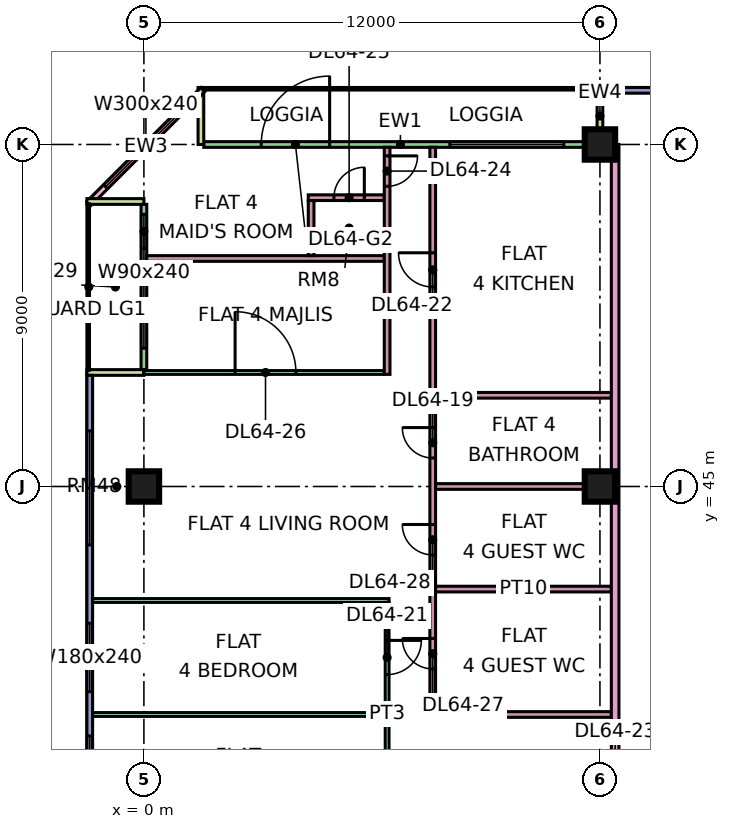
"""IFC4 building model, lengths in metres.
Left out: names, types, materials, properties, quantities, classifications, styles, units other than length and angle.
Written with IfcOpenShell. Run it as: python <this file> out.ifc"""

import sys

from ifc_helpers import new_model, si_unit, direction, frame, frame_2d, origin, origin_2d, place, context, subcontext, project, spatial, rectangle, extrude, element, fill, save


model = new_model("IFC4")
c1 = context("Model", 3, precision=1e-05, world=origin(), true_north=direction((0.0, 1.0)))
c2 = subcontext(c1, "Body", "Model", "MODEL_VIEW")
j1 = project(units=[si_unit("LENGTHUNIT", "METRE"), si_unit("PLANEANGLEUNIT", "RADIAN")], contexts=[c1])
p1 = place(None, origin())
s1 = spatial("IfcSite", under=j1, at=p1, CompositionType="ELEMENT")
p2 = place(p1, origin())
s2 = spatial("IfcBuilding", under=s1, at=p2, CompositionType="ELEMENT")
p3 = place(p2, frame((0.0, 0.0, 277.15)))
s3 = spatial("IfcBuildingStorey", under=s2, at=p3, CompositionType="ELEMENT", Elevation=277.15)
for number, where, z_axis, x_axis in (
    (1, (0.0, 45.0, 0.0), (0.0, 0.0, 1.0), (1.0, 0.0, 0.0)),
    (2, (12.0, 45.0, 0.0), (0.0, 0.0, 1.0), (1.0, 0.0, 0.0)),
    (3, (12.0, 54.0, 0.0), (0.0, 0.0, 1.0), (1.0, 0.0, 0.0)),
):
    element("IfcColumn", number, at=place(p3, frame(where, z_axis=z_axis, x_axis=x_axis)), inside=s3, PredefinedType="COLUMN", context=c2, shape_type="SweptSolid", body=[
        extrude(rectangle(XDim=0.8, YDim=0.8, at=origin_2d()), origin(), (0.0, 0.0, 1.0), 3.75),
    ])
p4 = place(p3, frame((22.5, 55.425, 0.0), z_axis=(0.0, 0.0, 1.0), x_axis=(-1.0, 0.0, 0.0)))
e4 = element("IfcWall", 4, at=p4, inside=s3, PredefinedType="SOLIDWALL", context=c2, shape_type="SweptSolid", body=[
    extrude(rectangle(XDim=10.425, YDim=0.15, at=frame_2d((5.212, 0.0))), origin(), (0.0, 0.0, 1.0), 3.35),
])
p5 = place(p4, frame((1.05, 0.0, 0.45)))
e5 = element("IfcOpeningElement", 5, at=p5, cuts=e4, PredefinedType="OPENING", context=c2, shape_type="SweptSolid", body=[
    extrude(rectangle(XDim=4.8, YDim=2.4, at=frame_2d((2.4, 1.2))), frame((0.0, 0.085, 0.0), z_axis=(0.0, -1.0, 0.0), x_axis=(1.0, 0.0, 0.0)), (0.0, 0.0, 1.0), 0.17),
])
p6 = place(p3, frame((11.925, 54.0, 0.0), z_axis=(0.0, 0.0, 1.0), x_axis=(-1.0, 0.0, 0.0)))
e6 = element("IfcWall", 6, at=p6, inside=s3, PredefinedType="SOLIDWALL", context=c2, shape_type="SweptSolid", body=[
    extrude(rectangle(XDim=10.35, YDim=0.15, at=frame_2d((5.175, 0.0))), origin(), (0.0, 0.0, 1.0), 3.35),
])
p7 = place(p6, frame((0.875, 0.0, 0.45)))
e7 = element("IfcOpeningElement", 7, at=p7, cuts=e6, PredefinedType="OPENING", context=c2, shape_type="SweptSolid", body=[
    extrude(rectangle(XDim=3.0, YDim=2.4, at=frame_2d((1.5, 1.2))), frame((0.0, 0.085, 0.0), z_axis=(0.0, -1.0, 0.0), x_axis=(1.0, 0.0, 0.0)), (0.0, 0.0, 1.0), 0.17),
])
p8 = place(p6, frame((7.038, 0.0, 0.0)))
e8 = element("IfcOpeningElement", 8, at=p8, cuts=e6, PredefinedType="OPENING", context=c2, shape_type="SweptSolid", body=[
    extrude(rectangle(XDim=1.8, YDim=2.4, at=frame_2d((0.9, 1.2))), frame((0.0, 0.085, 0.0), z_axis=(0.0, -1.0, 0.0), x_axis=(1.0, 0.0, 0.0)), (0.0, 0.0, 1.0), 0.17),
])
for number, where, z_axis, x_axis in (
    (9, (12.0, 55.5, 0.0), (0.0, 0.0, 1.0), (0.0, -1.0, 0.0)),
    (10, (1.5, 55.5, 0.0), (0.0, 0.0, 1.0), (0.0, -1.0, 0.0)),
):
    element("IfcWall", number, at=place(p3, frame(where, z_axis=z_axis, x_axis=x_axis)), inside=s3, PredefinedType="SOLIDWALL", context=c2, shape_type="SweptSolid", body=[
        extrude(rectangle(XDim=1.5, YDim=0.15, at=frame_2d((0.75, 0.0))), origin(), (0.0, 0.0, 1.0), 3.35),
    ])
p9 = place(p3, frame((1.553, 55.447, 0.0), z_axis=(0.0, 0.0, 1.0), x_axis=(-0.707106781187, -0.707106781187, 0.0)))
e11 = element("IfcWall", 11, at=p9, inside=s3, PredefinedType="SOLIDWALL", context=c2, shape_type="SweptSolid", body=[
    extrude(rectangle(XDim=4.243, YDim=0.15, at=frame_2d((2.121, 0.0))), origin(), (0.0, 0.0, 1.0), 3.35),
])
p10 = place(p9, frame((0.621, 0.0, 0.45)))
e12 = element("IfcOpeningElement", 12, at=p10, cuts=e11, PredefinedType="OPENING", context=c2, shape_type="SweptSolid", body=[
    extrude(rectangle(XDim=3.0, YDim=2.4, at=frame_2d((1.5, 1.2))), frame((0.0, 0.085, 0.0), z_axis=(0.0, -1.0, 0.0), x_axis=(1.0, 0.0, 0.0)), (0.0, 0.0, 1.0), 0.17),
])
p11 = place(p3, frame((0.0, 52.425, 0.0), z_axis=(0.0, 0.0, 1.0), x_axis=(0.0, -1.0, 0.0)))
e13 = element("IfcWall", 13, at=p11, inside=s3, PredefinedType="SOLIDWALL", context=c2, shape_type="SweptSolid", body=[
    extrude(rectangle(XDim=4.35, YDim=0.15, at=frame_2d((2.175, 0.0))), origin(), (0.0, 0.0, 1.0), 3.35),
])
p12 = place(p11, frame((0.262, 0.0, 0.45)))
e14 = element("IfcOpeningElement", 14, at=p12, cuts=e13, PredefinedType="OPENING", context=c2, shape_type="SweptSolid", body=[
    extrude(rectangle(XDim=0.9, YDim=2.4, at=frame_2d((0.45, 1.2))), frame((0.0, 0.085, 0.0), z_axis=(0.0, -1.0, 0.0), x_axis=(1.0, 0.0, 0.0)), (0.0, 0.0, 1.0), 0.17),
])
p13 = place(p11, frame((1.988, 0.0, 0.45)))
e15 = element("IfcOpeningElement", 15, at=p13, cuts=e13, PredefinedType="OPENING", context=c2, shape_type="SweptSolid", body=[
    extrude(rectangle(XDim=1.8, YDim=2.4, at=frame_2d((0.9, 1.2))), frame((0.0, 0.085, 0.0), z_axis=(0.0, -1.0, 0.0), x_axis=(1.0, 0.0, 0.0)), (0.0, 0.0, 1.0), 0.17),
])
for number, where, z_axis, x_axis in (
    (16, (-1.5, 52.5, 0.0), (0.0, 0.0, 1.0), (1.0, 0.0, 0.0)),
    (17, (-1.5, 48.0, 0.0), (0.0, 0.0, 1.0), (1.0, 0.0, 0.0)),
):
    element("IfcWall", number, at=place(p3, frame(where, z_axis=z_axis, x_axis=x_axis)), inside=s3, PredefinedType="SOLIDWALL", context=c2, shape_type="SweptSolid", body=[
        extrude(rectangle(XDim=1.5, YDim=0.15, at=frame_2d((0.75, 0.0))), origin(), (0.0, 0.0, 1.0), 3.35),
    ])
p14 = place(p3, frame((-1.425, 47.925, 0.0), z_axis=(0.0, 0.0, 1.0), x_axis=(0.0, -1.0, 0.0)))
e18 = element("IfcWall", 18, at=p14, inside=s3, PredefinedType="SOLIDWALL", context=c2, shape_type="SweptSolid", body=[
    extrude(rectangle(XDim=11.85, YDim=0.15, at=frame_2d((5.925, 0.0))), origin(), (0.0, 0.0, 1.0), 3.35),
])
p15 = place(p14, frame((1.462, 0.0, 0.45)))
e19 = element("IfcOpeningElement", 19, at=p15, cuts=e18, PredefinedType="OPENING", context=c2, shape_type="SweptSolid", body=[
    extrude(rectangle(XDim=3.0, YDim=2.4, at=frame_2d((1.5, 1.2))), frame((0.0, 0.085, 0.0), z_axis=(0.0, -1.0, 0.0), x_axis=(1.0, 0.0, 0.0)), (0.0, 0.0, 1.0), 0.17),
])
p16 = place(p14, frame((6.525, 0.0, 0.45)))
e20 = element("IfcOpeningElement", 20, at=p16, cuts=e18, PredefinedType="OPENING", context=c2, shape_type="SweptSolid", body=[
    extrude(rectangle(XDim=1.8, YDim=2.4, at=frame_2d((0.9, 1.2))), frame((0.0, 0.085, 0.0), z_axis=(0.0, -1.0, 0.0), x_axis=(1.0, 0.0, 0.0)), (0.0, 0.0, 1.0), 0.17),
])
p17 = place(p14, frame((9.488, 0.0, 0.45)))
e21 = element("IfcOpeningElement", 21, at=p17, cuts=e18, PredefinedType="OPENING", context=c2, shape_type="SweptSolid", body=[
    extrude(rectangle(XDim=1.8, YDim=2.4, at=frame_2d((0.9, 1.2))), frame((0.0, 0.085, 0.0), z_axis=(0.0, -1.0, 0.0), x_axis=(1.0, 0.0, 0.0)), (0.0, 0.0, 1.0), 0.17),
])
p18 = place(p3, frame((-1.351, 39.0, 0.0), z_axis=(0.0, 0.0, 1.0), x_axis=(1.0, 0.0, 0.0)))
e22 = element("IfcWall", 22, at=p18, inside=s3, PredefinedType="PARTITIONING", context=c2, shape_type="SweptSolid", body=[
    extrude(rectangle(XDim=7.701, YDim=0.1, at=frame_2d((3.851, 0.0))), origin(), (0.0, 0.0, 1.0), 3.35),
])
p19 = place(p3, frame((-1.35, 42.0, 0.0), z_axis=(0.0, 0.0, 1.0), x_axis=(1.0, 0.0, 0.0)))
e23 = element("IfcWall", 23, at=p19, inside=s3, PredefinedType="PARTITIONING", context=c2, shape_type="SweptSolid", body=[
    extrude(rectangle(XDim=7.8, YDim=0.1, at=frame_2d((3.9, 0.0))), origin(), (0.0, 0.0, 1.0), 3.35),
])
p20 = place(p3, frame((0.0, 48.0, 0.0), z_axis=(0.0, 0.0, 1.0), x_axis=(1.0, 0.0, 0.0)))
e24 = element("IfcWall", 24, at=p20, inside=s3, PredefinedType="PARTITIONING", context=c2, shape_type="SweptSolid", body=[
    extrude(rectangle(XDim=6.325, YDim=0.1, at=frame_2d((3.163, 0.0))), origin(), (0.0, 0.0, 1.0), 3.35),
])
p21 = place(p20, frame((2.4, 0.0, 0.0)))
e25 = element("IfcOpeningElement", 25, at=p21, cuts=e24, PredefinedType="OPENING", context=c2, shape_type="SweptSolid", body=[
    extrude(rectangle(XDim=1.6, YDim=2.1, at=frame_2d((0.8, 1.05))), frame((0.0, 0.06, 0.0), z_axis=(0.0, -1.0, 0.0), x_axis=(1.0, 0.0, 0.0)), (0.0, 0.0, 1.0), 0.12),
])
p22 = place(p3, frame((0.074, 51.0, 0.0), z_axis=(0.0, 0.0, 1.0), x_axis=(1.0, 0.0, 0.0)))
e26 = element("IfcWall", 26, at=p22, inside=s3, PredefinedType="PARTITIONING", context=c2, shape_type="SweptSolid", body=[
    extrude(rectangle(XDim=6.251, YDim=0.15, at=frame_2d((3.125, 0.0))), origin(), (0.0, 0.0, 1.0), 3.35),
])
p23 = place(p3, frame((4.325, 52.6, 0.0), z_axis=(0.0, 0.0, 1.0), x_axis=(1.0, 0.0, 0.0)))
e27 = element("IfcWall", 27, at=p23, inside=s3, PredefinedType="PARTITIONING", context=c2, shape_type="SweptSolid", body=[
    extrude(rectangle(XDim=2.0, YDim=0.15, at=frame_2d((1.0, 0.0))), origin(), (0.0, 0.0, 1.0), 3.35),
])
p24 = place(p23, frame((0.675, 0.0, 0.0)))
e28 = element("IfcOpeningElement", 28, at=p24, cuts=e27, PredefinedType="OPENING", context=c2, shape_type="SweptSolid", body=[
    extrude(rectangle(XDim=0.8, YDim=2.1, at=frame_2d((0.4, 1.05))), frame((0.0, 0.085, 0.0), z_axis=(0.0, -1.0, 0.0), x_axis=(1.0, 0.0, 0.0)), (0.0, 0.0, 1.0), 0.17),
])
p25 = place(p3, frame((4.4, 51.075, 0.0), z_axis=(0.0, 0.0, 1.0), x_axis=(0.0, 1.0, 0.0)))
e29 = element("IfcWall", 29, at=p25, inside=s3, PredefinedType="PARTITIONING", context=c2, shape_type="SweptSolid", body=[
    extrude(rectangle(XDim=1.45, YDim=0.15, at=frame_2d((0.725, 0.0))), origin(), (0.0, 0.0, 1.0), 3.35),
])
p26 = place(p3, frame((6.4, 36.1, 0.0), z_axis=(0.0, 0.0, 1.0), x_axis=(0.0, 1.0, 0.0)))
e30 = element("IfcWall", 30, at=p26, inside=s3, PredefinedType="PARTITIONING", context=c2, shape_type="SweptSolid", body=[
    extrude(rectangle(XDim=5.85, YDim=0.1, at=frame_2d((2.925, 0.0))), origin(), (0.0, 0.0, 1.0), 3.35),
])
p27 = place(p26, frame((0.95, 0.0, 0.0)))
e31 = element("IfcOpeningElement", 31, at=p27, cuts=e30, PredefinedType="OPENING", context=c2, shape_type="SweptSolid", body=[
    extrude(rectangle(XDim=0.9, YDim=2.1, at=frame_2d((0.45, 1.05))), frame((0.0, 0.06, 0.0), z_axis=(0.0, -1.0, 0.0), x_axis=(1.0, 0.0, 0.0)), (0.0, 0.0, 1.0), 0.12),
])
p28 = place(p26, frame((3.95, 0.0, 0.0)))
e32 = element("IfcOpeningElement", 32, at=p28, cuts=e30, PredefinedType="OPENING", context=c2, shape_type="SweptSolid", body=[
    extrude(rectangle(XDim=0.9, YDim=2.1, at=frame_2d((0.45, 1.05))), frame((0.0, 0.06, 0.0), z_axis=(0.0, -1.0, 0.0), x_axis=(1.0, 0.0, 0.0)), (0.0, 0.0, 1.0), 0.12),
])
p29 = place(p3, frame((6.4, 47.95, 0.0), z_axis=(0.0, 0.0, 1.0), x_axis=(0.0, 1.0, 0.0)))
e33 = element("IfcWall", 33, at=p29, inside=s3, PredefinedType="PARTITIONING", context=c2, shape_type="SweptSolid", body=[
    extrude(rectangle(XDim=5.976, YDim=0.15, at=frame_2d((2.988, 0.0))), origin(), (0.0, 0.0, 1.0), 3.35),
])
p30 = place(p29, frame((4.95, 0.0, 0.0)))
e34 = element("IfcOpeningElement", 34, at=p30, cuts=e33, PredefinedType="OPENING", context=c2, shape_type="SweptSolid", body=[
    extrude(rectangle(XDim=0.8, YDim=2.1, at=frame_2d((0.4, 1.05))), frame((0.0, 0.085, 0.0), z_axis=(0.0, -1.0, 0.0), x_axis=(1.0, 0.0, 0.0)), (0.0, 0.0, 1.0), 0.17),
])
p31 = place(p3, frame((7.6, 38.925, 0.0), z_axis=(0.0, 0.0, 1.0), x_axis=(0.0, 1.0, 0.0)))
e35 = element("IfcWall", 35, at=p31, inside=s3, PredefinedType="PARTITIONING", context=c2, shape_type="SweptSolid", body=[
    extrude(rectangle(XDim=15.001, YDim=0.15, at=frame_2d((7.5, 0.0))), origin(), (0.0, 0.0, 1.0), 3.35),
])
p32 = place(p31, frame((6.825, 0.0, 0.0)))
e36 = element("IfcOpeningElement", 36, at=p32, cuts=e35, PredefinedType="OPENING", context=c2, shape_type="SweptSolid", body=[
    extrude(rectangle(XDim=0.8, YDim=2.1, at=frame_2d((0.4, 1.05))), frame((0.0, 0.085, 0.0), z_axis=(0.0, -1.0, 0.0), x_axis=(1.0, 0.0, 0.0)), (0.0, 0.0, 1.0), 0.17),
])
p33 = place(p31, frame((11.325, 0.0, 0.0)))
e37 = element("IfcOpeningElement", 37, at=p33, cuts=e35, PredefinedType="OPENING", context=c2, shape_type="SweptSolid", body=[
    extrude(rectangle(XDim=0.9, YDim=2.1, at=frame_2d((0.45, 1.05))), frame((0.0, 0.085, 0.0), z_axis=(0.0, -1.0, 0.0), x_axis=(1.0, 0.0, 0.0)), (0.0, 0.0, 1.0), 0.17),
])
p34 = place(p31, frame((1.275, 0.0, 0.0)))
e38 = element("IfcOpeningElement", 38, at=p34, cuts=e35, PredefinedType="OPENING", context=c2, shape_type="SweptSolid", body=[
    extrude(rectangle(XDim=0.8, YDim=2.1, at=frame_2d((0.4, 1.05))), frame((0.0, 0.085, 0.0), z_axis=(0.0, -1.0, 0.0), x_axis=(1.0, 0.0, 0.0)), (0.0, 0.0, 1.0), 0.17),
])
p35 = place(p31, frame((4.275, 0.0, 0.0)))
e39 = element("IfcOpeningElement", 39, at=p35, cuts=e35, PredefinedType="OPENING", context=c2, shape_type="SweptSolid", body=[
    extrude(rectangle(XDim=0.8, YDim=2.1, at=frame_2d((0.4, 1.05))), frame((0.0, 0.085, 0.0), z_axis=(0.0, -1.0, 0.0), x_axis=(1.0, 0.0, 0.0)), (0.0, 0.0, 1.0), 0.17),
])
for number, where, z_axis, x_axis in (
    (40, (7.675, 39.0, 0.0), (0.0, 0.0, 1.0), (1.0, 0.0, 0.0)),
    (41, (7.675, 42.3, 0.0), (0.0, 0.0, 1.0), (1.0, 0.0, 0.0)),
    (42, (7.675, 45.0, 0.0), (0.0, 0.0, 1.0), (1.0, 0.0, 0.0)),
    (43, (7.675, 47.4, 0.0), (0.0, 0.0, 1.0), (1.0, 0.0, 0.0)),
):
    element("IfcWall", number, at=place(p3, frame(where, z_axis=z_axis, x_axis=x_axis)), inside=s3, PredefinedType="PARTITIONING", context=c2, shape_type="SweptSolid", body=[
        extrude(rectangle(XDim=4.625, YDim=0.15, at=frame_2d((2.312, 0.0))), origin(), (0.0, 0.0, 1.0), 3.35),
    ])
p36 = place(p3, frame((12.4, 20.0, 0.0), z_axis=(0.0, 0.0, 1.0), x_axis=(0.0, 1.0, 0.0)))
e44 = element("IfcWall", 44, at=p36, inside=s3, PredefinedType="PARTITIONING", context=c2, shape_type="SweptSolid", body=[
    extrude(rectangle(XDim=34.0, YDim=0.2, at=frame_2d((17.0, 0.0))), origin(), (0.0, 0.0, 1.0), 3.35),
])
p37 = place(p36, frame((16.95, 0.0, 0.0)))
e45 = element("IfcOpeningElement", 45, at=p37, cuts=e44, PredefinedType="OPENING", context=c2, shape_type="SweptSolid", body=[
    extrude(rectangle(XDim=1.0, YDim=2.1, at=frame_2d((0.5, 1.05))), frame((0.0, 0.11, 0.0), z_axis=(0.0, -1.0, 0.0), x_axis=(1.0, 0.0, 0.0)), (0.0, 0.0, 1.0), 0.22),
])
p38 = place(p36, frame((0.6, 0.0, 0.0)))
e46 = element("IfcOpeningElement", 46, at=p38, cuts=e44, PredefinedType="OPENING", context=c2, shape_type="SweptSolid", body=[
    extrude(rectangle(XDim=1.2, YDim=2.1, at=frame_2d((0.6, 1.05))), frame((0.0, 0.11, 0.0), z_axis=(0.0, -1.0, 0.0), x_axis=(1.0, 0.0, 0.0)), (0.0, 0.0, 1.0), 0.22),
])
p39 = place(p36, frame((13.65, 0.0, 0.0)))
e47 = element("IfcOpeningElement", 47, at=p39, cuts=e44, PredefinedType="OPENING", context=c2, shape_type="SweptSolid", body=[
    extrude(rectangle(XDim=1.0, YDim=2.1, at=frame_2d((0.5, 1.05))), frame((0.0, 0.11, 0.0), z_axis=(0.0, -1.0, 0.0), x_axis=(1.0, 0.0, 0.0)), (0.0, 0.0, 1.0), 0.22),
])
p40 = place(p7, origin())
e48 = element("IfcWindow", 48, at=p40, inside=s3, PartitioningType="SINGLE_PANEL", PredefinedType="WINDOW", context=c2, shape_type="SweptSolid", body=[
    extrude(rectangle(XDim=3.0, YDim=2.4, at=frame_2d((1.5, 1.2))), frame((0.0, 0.03, 0.0), z_axis=(0.0, -1.0, 0.0), x_axis=(1.0, 0.0, 0.0)), (0.0, 0.0, 1.0), 0.06),
])
fill(e7, e48)
p41 = place(p8, frame((1.8, 0.0, 0.0), z_axis=(0.0, 0.0, 1.0), x_axis=(-1.0, 0.0, 0.0)))
e49 = element("IfcDoor", 49, at=p41, inside=s3, OperationType="DOUBLE_DOOR_SINGLE_SWING", PredefinedType="DOOR", context=c2, shape_type="SweptSolid", body=[
    extrude(rectangle(XDim=1.8, YDim=2.4, at=frame_2d((0.9, 1.2))), frame((0.0, 0.025, 0.0), z_axis=(0.0, -1.0, 0.0), x_axis=(1.0, 0.0, 0.0)), (0.0, 0.0, 1.0), 0.05),
])
fill(e8, e49)
p42 = place(p10, origin())
e50 = element("IfcWindow", 50, at=p42, inside=s3, PartitioningType="SINGLE_PANEL", PredefinedType="WINDOW", context=c2, shape_type="SweptSolid", body=[
    extrude(rectangle(XDim=3.0, YDim=2.4, at=frame_2d((1.5, 1.2))), frame((0.0, 0.03, 0.0), z_axis=(0.0, -1.0, 0.0), x_axis=(1.0, 0.0, 0.0)), (0.0, 0.0, 1.0), 0.06),
])
fill(e12, e50)
p43 = place(p12, origin())
e51 = element("IfcWindow", 51, at=p43, inside=s3, PartitioningType="SINGLE_PANEL", PredefinedType="WINDOW", context=c2, shape_type="SweptSolid", body=[
    extrude(rectangle(XDim=0.9, YDim=2.4, at=frame_2d((0.45, 1.2))), frame((0.0, 0.03, 0.0), z_axis=(0.0, -1.0, 0.0), x_axis=(1.0, 0.0, 0.0)), (0.0, 0.0, 1.0), 0.06),
])
fill(e14, e51)
p44 = place(p13, origin())
e52 = element("IfcWindow", 52, at=p44, inside=s3, PartitioningType="SINGLE_PANEL", PredefinedType="WINDOW", context=c2, shape_type="SweptSolid", body=[
    extrude(rectangle(XDim=1.8, YDim=2.4, at=frame_2d((0.9, 1.2))), frame((0.0, 0.03, 0.0), z_axis=(0.0, -1.0, 0.0), x_axis=(1.0, 0.0, 0.0)), (0.0, 0.0, 1.0), 0.06),
])
fill(e15, e52)
p45 = place(p15, origin())
e53 = element("IfcWindow", 53, at=p45, inside=s3, PartitioningType="SINGLE_PANEL", PredefinedType="WINDOW", context=c2, shape_type="SweptSolid", body=[
    extrude(rectangle(XDim=3.0, YDim=2.4, at=frame_2d((1.5, 1.2))), frame((0.0, 0.03, 0.0), z_axis=(0.0, -1.0, 0.0), x_axis=(1.0, 0.0, 0.0)), (0.0, 0.0, 1.0), 0.06),
])
fill(e19, e53)
p46 = place(p16, origin())
e54 = element("IfcWindow", 54, at=p46, inside=s3, PartitioningType="SINGLE_PANEL", PredefinedType="WINDOW", context=c2, shape_type="SweptSolid", body=[
    extrude(rectangle(XDim=1.8, YDim=2.4, at=frame_2d((0.9, 1.2))), frame((0.0, 0.03, 0.0), z_axis=(0.0, -1.0, 0.0), x_axis=(1.0, 0.0, 0.0)), (0.0, 0.0, 1.0), 0.06),
])
fill(e20, e54)
p47 = place(p17, origin())
e55 = element("IfcWindow", 55, at=p47, inside=s3, PartitioningType="SINGLE_PANEL", PredefinedType="WINDOW", context=c2, shape_type="SweptSolid", body=[
    extrude(rectangle(XDim=1.8, YDim=2.4, at=frame_2d((0.9, 1.2))), frame((0.0, 0.03, 0.0), z_axis=(0.0, -1.0, 0.0), x_axis=(1.0, 0.0, 0.0)), (0.0, 0.0, 1.0), 0.06),
])
fill(e21, e55)
p48 = place(p32, frame((0.8, 0.0, 0.0), z_axis=(0.0, 0.0, 1.0), x_axis=(-1.0, 0.0, 0.0)))
e56 = element("IfcDoor", 56, at=p48, inside=s3, OperationType="SINGLE_SWING_RIGHT", PredefinedType="DOOR", context=c2, shape_type="SweptSolid", body=[
    extrude(rectangle(XDim=0.8, YDim=2.1, at=frame_2d((0.4, 1.05))), frame((0.0, 0.025, 0.0), z_axis=(0.0, -1.0, 0.0), x_axis=(1.0, 0.0, 0.0)), (0.0, 0.0, 1.0), 0.05),
])
fill(e36, e56)
p49 = place(p28, origin())
e57 = element("IfcDoor", 57, at=p49, inside=s3, OperationType="SINGLE_SWING_RIGHT", PredefinedType="DOOR", context=c2, shape_type="SweptSolid", body=[
    extrude(rectangle(XDim=0.9, YDim=2.1, at=frame_2d((0.45, 1.05))), frame((0.0, 0.025, 0.0), z_axis=(0.0, -1.0, 0.0), x_axis=(1.0, 0.0, 0.0)), (0.0, 0.0, 1.0), 0.05),
])
fill(e32, e57)
p50 = place(p33, frame((0.9, 0.0, 0.0), z_axis=(0.0, 0.0, 1.0), x_axis=(-1.0, 0.0, 0.0)))
e58 = element("IfcDoor", 58, at=p50, inside=s3, OperationType="SINGLE_SWING_RIGHT", PredefinedType="DOOR", context=c2, shape_type="SweptSolid", body=[
    extrude(rectangle(XDim=0.9, YDim=2.1, at=frame_2d((0.45, 1.05))), frame((0.0, 0.025, 0.0), z_axis=(0.0, -1.0, 0.0), x_axis=(1.0, 0.0, 0.0)), (0.0, 0.0, 1.0), 0.05),
])
fill(e37, e58)
p51 = place(p30, origin())
e59 = element("IfcDoor", 59, at=p51, inside=s3, OperationType="SINGLE_SWING_RIGHT", PredefinedType="DOOR", context=c2, shape_type="SweptSolid", body=[
    extrude(rectangle(XDim=0.8, YDim=2.1, at=frame_2d((0.4, 1.05))), frame((0.0, 0.025, 0.0), z_axis=(0.0, -1.0, 0.0), x_axis=(1.0, 0.0, 0.0)), (0.0, 0.0, 1.0), 0.05),
])
fill(e34, e59)
p52 = place(p24, frame((0.8, 0.0, 0.0), z_axis=(0.0, 0.0, 1.0), x_axis=(-1.0, 0.0, 0.0)))
e60 = element("IfcDoor", 60, at=p52, inside=s3, OperationType="SINGLE_SWING_RIGHT", PredefinedType="DOOR", context=c2, shape_type="SweptSolid", body=[
    extrude(rectangle(XDim=0.8, YDim=2.1, at=frame_2d((0.4, 1.05))), frame((0.0, 0.025, 0.0), z_axis=(0.0, -1.0, 0.0), x_axis=(1.0, 0.0, 0.0)), (0.0, 0.0, 1.0), 0.05),
])
fill(e28, e60)
p53 = place(p21, origin())
e61 = element("IfcDoor", 61, at=p53, inside=s3, OperationType="DOUBLE_DOOR_SINGLE_SWING", PredefinedType="DOOR", context=c2, shape_type="SweptSolid", body=[
    extrude(rectangle(XDim=1.6, YDim=2.1, at=frame_2d((0.8, 1.05))), frame((0.0, 0.025, 0.0), z_axis=(0.0, -1.0, 0.0), x_axis=(1.0, 0.0, 0.0)), (0.0, 0.0, 1.0), 0.05),
])
fill(e25, e61)
p54 = place(p34, frame((0.8, 0.0, 0.0), z_axis=(0.0, 0.0, 1.0), x_axis=(-1.0, 0.0, 0.0)))
e62 = element("IfcDoor", 62, at=p54, inside=s3, OperationType="SINGLE_SWING_RIGHT", PredefinedType="DOOR", context=c2, shape_type="SweptSolid", body=[
    extrude(rectangle(XDim=0.8, YDim=2.1, at=frame_2d((0.4, 1.05))), frame((0.0, 0.025, 0.0), z_axis=(0.0, -1.0, 0.0), x_axis=(1.0, 0.0, 0.0)), (0.0, 0.0, 1.0), 0.05),
])
fill(e38, e62)
p55 = place(p35, frame((0.8, 0.0, 0.0), z_axis=(0.0, 0.0, 1.0), x_axis=(-1.0, 0.0, 0.0)))
e63 = element("IfcDoor", 63, at=p55, inside=s3, OperationType="SINGLE_SWING_RIGHT", PredefinedType="DOOR", context=c2, shape_type="SweptSolid", body=[
    extrude(rectangle(XDim=0.8, YDim=2.1, at=frame_2d((0.4, 1.05))), frame((0.0, 0.025, 0.0), z_axis=(0.0, -1.0, 0.0), x_axis=(1.0, 0.0, 0.0)), (0.0, 0.0, 1.0), 0.05),
])
fill(e39, e63)
save(model, sys.argv[1])
